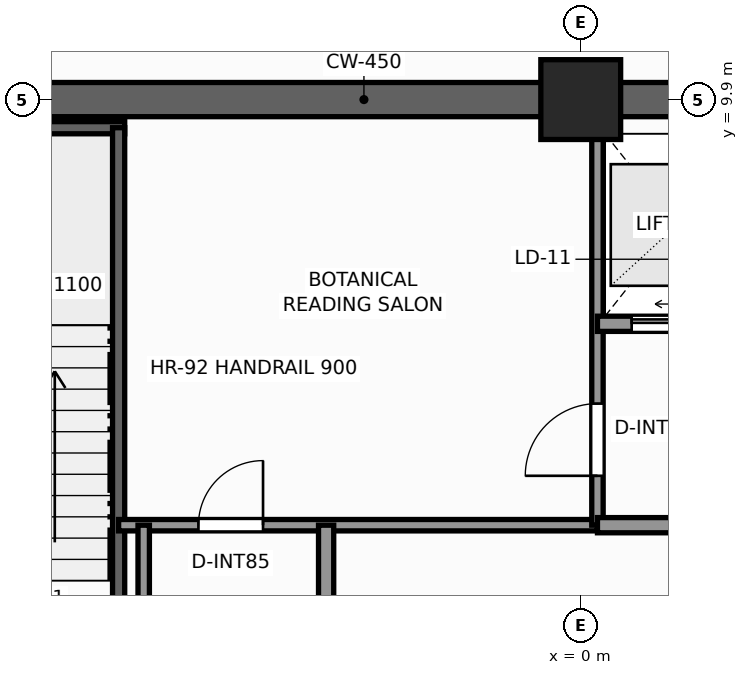
"""IFC4 building model, lengths in metres.
Left out: names, types, materials, properties, quantities, classifications, styles, units other than length and angle.
Written with IfcOpenShell. Run it as: python <this file> out.ifc"""

import sys

from ifc_helpers import new_model, si_unit, direction, frame, frame_2d, origin, origin_2d, place, context, subcontext, project, spatial, rectangle, extrude, element, fill, save


model = new_model("IFC4")
c1 = context("Model", 3, precision=1e-05, world=origin(), true_north=direction((0.0, 1.0)))
c2 = subcontext(c1, "Body", "Model", "MODEL_VIEW")
j1 = project(units=[si_unit("LENGTHUNIT", "METRE"), si_unit("PLANEANGLEUNIT", "RADIAN")], contexts=[c1])
p1 = place(None, origin())
s1 = spatial("IfcSite", under=j1, at=p1, CompositionType="ELEMENT")
p2 = place(p1, origin())
s2 = spatial("IfcBuilding", under=s1, at=p2, CompositionType="ELEMENT")
p3 = place(p2, frame((0.0, 0.0, 262.8)))
s3 = spatial("IfcBuildingStorey", under=s2, at=p3, CompositionType="ELEMENT", Elevation=262.8)
p4 = place(p3, frame((-10.125, 9.9, 0.0), z_axis=(0.0, 0.0, 1.0), x_axis=(1.0, 0.0, 0.0)))
e1 = element("IfcWall", 1, at=p4, inside=s3, PredefinedType="SHEAR", context=c2, shape_type="SweptSolid", body=[
    extrude(rectangle(XDim=14.545, YDim=0.45, at=frame_2d((7.272, 0.0))), origin(), (0.0, 0.0, 1.0), 4.6),
])
p5 = place(p3, frame((0.0, 9.9, 0.0), z_axis=(0.0, 0.0, 1.0), x_axis=(1.0, 0.0, 0.0)))
e2 = element("IfcColumn", 2, at=p5, inside=s3, PredefinedType="COLUMN", context=c2, shape_type="SweptSolid", body=[
    extrude(rectangle(XDim=1.05, YDim=1.05, at=origin_2d()), origin(), (0.0, 0.0, 1.0), 4.6),
])
p6 = place(p3, frame((-9.52, 9.53, 0.0), z_axis=(0.0, 0.0, 1.0), x_axis=(1.0, 0.0, 0.0)))
e3 = element("IfcWall", 3, at=p6, inside=s3, PredefinedType="SHEAR", context=c2, shape_type="SweptSolid", body=[
    extrude(rectangle(XDim=3.52, YDim=0.16, at=frame_2d((1.76, 0.0))), origin(), (0.0, 0.0, 1.0), 4.6),
])
p7 = place(p3, frame((-6.08, 1.97, 0.0), z_axis=(0.0, 0.0, 1.0), x_axis=(0.0, 1.0, 0.0)))
e4 = element("IfcWall", 4, at=p7, inside=s3, PredefinedType="SHEAR", context=c2, shape_type="SweptSolid", body=[
    extrude(rectangle(XDim=7.56, YDim=0.16, at=frame_2d((3.78, 0.0))), origin(), (0.0, 0.0, 1.0), 4.6),
])
p8 = place(p3, frame((-6.08, 4.3, 0.0), z_axis=(0.0, 0.0, 1.0), x_axis=(1.0, 0.0, 0.0)))
e5 = element("IfcWall", 5, at=p8, inside=s3, PredefinedType="PARTITIONING", context=c2, shape_type="SweptSolid", body=[
    extrude(rectangle(XDim=6.3, YDim=0.15, at=frame_2d((3.15, 0.0))), origin(), (0.0, 0.0, 1.0), 4.32),
])
p9 = place(p8, frame((1.05, 0.0, 0.0)))
e6 = element("IfcOpeningElement", 6, at=p9, cuts=e5, PredefinedType="OPENING", context=c2, shape_type="SweptSolid", body=[
    extrude(rectangle(XDim=0.85, YDim=2.03, at=frame_2d((0.425, 1.015))), frame((0.0, 0.085, 0.0), z_axis=(0.0, -1.0, 0.0), x_axis=(1.0, 0.0, 0.0)), (0.0, 0.0, 1.0), 0.17),
])
p10 = place(p3, frame((0.22, 4.3, 0.0), z_axis=(0.0, 0.0, 1.0), x_axis=(0.0, 1.0, 0.0)))
e7 = element("IfcWall", 7, at=p10, inside=s3, PredefinedType="PARTITIONING", context=c2, shape_type="SweptSolid", body=[
    extrude(rectangle(XDim=5.22, YDim=0.15, at=frame_2d((2.61, 0.0))), origin(), (0.0, 0.0, 1.0), 4.32),
])
p11 = place(p10, frame((0.65, 0.0, 0.0)))
e8 = element("IfcOpeningElement", 8, at=p11, cuts=e7, PredefinedType="OPENING", context=c2, shape_type="SweptSolid", body=[
    extrude(rectangle(XDim=0.95, YDim=2.06, at=frame_2d((0.475, 1.03))), frame((0.0, 0.085, 0.0), z_axis=(0.0, -1.0, 0.0), x_axis=(1.0, 0.0, 0.0)), (0.0, 0.0, 1.0), 0.17),
])
p12 = place(p3, frame((0.22, 6.95, 0.0), z_axis=(0.0, 0.0, 1.0), x_axis=(1.0, 0.0, 0.0)))
e9 = element("IfcWall", 9, at=p12, inside=s3, PredefinedType="SOLIDWALL", context=c2, shape_type="SweptSolid", body=[
    extrude(rectangle(XDim=4.18, YDim=0.2, at=frame_2d((2.09, 0.0))), origin(), (0.0, 0.0, 1.0), 4.32),
])
p13 = place(p12, frame((0.45, 0.0, 0.0)))
e10 = element("IfcOpeningElement", 10, at=p13, cuts=e9, PredefinedType="OPENING", context=c2, shape_type="SweptSolid", body=[
    extrude(rectangle(XDim=1.1, YDim=2.2, at=frame_2d((0.55, 1.1))), frame((0.0, 0.11, 0.0), z_axis=(0.0, -1.0, 0.0), x_axis=(1.0, 0.0, 0.0)), (0.0, 0.0, 1.0), 0.22),
])
p14 = place(p12, frame((2.53, 0.0, 0.0)))
e11 = element("IfcOpeningElement", 11, at=p14, cuts=e9, PredefinedType="OPENING", context=c2, shape_type="SweptSolid", body=[
    extrude(rectangle(XDim=1.1, YDim=2.2, at=frame_2d((0.55, 1.1))), frame((0.0, 0.11, 0.0), z_axis=(0.0, -1.0, 0.0), x_axis=(1.0, 0.0, 0.0)), (0.0, 0.0, 1.0), 0.22),
])
p15 = place(p3, frame((0.22, 4.3, 0.0), z_axis=(0.0, 0.0, 1.0), x_axis=(1.0, 0.0, 0.0)))
e12 = element("IfcWall", 12, at=p15, inside=s3, PredefinedType="SOLIDWALL", context=c2, shape_type="SweptSolid", body=[
    extrude(rectangle(XDim=3.13, YDim=0.2, at=frame_2d((1.565, 0.0))), origin(), (0.0, 0.0, 1.0), 4.32),
])
p16 = place(p15, frame((1.05, 0.0, 0.0)))
e13 = element("IfcOpeningElement", 13, at=p16, cuts=e12, PredefinedType="OPENING", context=c2, shape_type="SweptSolid", body=[
    extrude(rectangle(XDim=0.95, YDim=2.06, at=frame_2d((0.475, 1.03))), frame((0.0, 0.11, 0.0), z_axis=(0.0, -1.0, 0.0), x_axis=(1.0, 0.0, 0.0)), (0.0, 0.0, 1.0), 0.22),
])
p17 = place(p3, frame((-3.35, 1.1, 0.0), z_axis=(0.0, 0.0, 1.0), x_axis=(0.0, 1.0, 0.0)))
e14 = element("IfcWall", 14, at=p17, inside=s3, PredefinedType="SOLIDWALL", context=c2, shape_type="SweptSolid", body=[
    extrude(rectangle(XDim=3.2, YDim=0.2, at=frame_2d((1.6, 0.0))), origin(), (0.0, 0.0, 1.0), 4.32),
])
p18 = place(p3, frame((-5.75, 1.97, 0.0), z_axis=(0.0, 0.0, 1.0), x_axis=(0.0, 1.0, 0.0)))
e15 = element("IfcWall", 15, at=p18, inside=s3, PredefinedType="PARTITIONING", context=c2, shape_type="SweptSolid", body=[
    extrude(rectangle(XDim=2.33, YDim=0.15, at=frame_2d((1.165, 0.0))), origin(), (0.0, 0.0, 1.0), 4.32),
])
p19 = place(p11, origin())
e16 = element("IfcDoor", 16, at=p19, inside=s3, OperationType="SINGLE_SWING_LEFT", PredefinedType="DOOR", context=c2, shape_type="SweptSolid", body=[
    extrude(rectangle(XDim=0.95, YDim=2.06, at=frame_2d((0.475, 1.03))), frame((0.0, 0.025, 0.0), z_axis=(0.0, -1.0, 0.0), x_axis=(1.0, 0.0, 0.0)), (0.0, 0.0, 1.0), 0.05),
])
fill(e8, e16)
p20 = place(p13, origin())
e17 = element("IfcDoor", 17, at=p20, inside=s3, OperationType="DOUBLE_DOOR_SLIDING", PredefinedType="DOOR", context=c2, shape_type="SweptSolid", body=[
    extrude(rectangle(XDim=1.1, YDim=2.2, at=frame_2d((0.55, 1.1))), frame((0.0, 0.025, 0.0), z_axis=(0.0, -1.0, 0.0), x_axis=(1.0, 0.0, 0.0)), (0.0, 0.0, 1.0), 0.05),
])
fill(e10, e17)
p21 = place(p9, origin())
e18 = element("IfcDoor", 18, at=p21, inside=s3, OperationType="SINGLE_SWING_RIGHT", PredefinedType="DOOR", context=c2, shape_type="SweptSolid", body=[
    extrude(rectangle(XDim=0.85, YDim=2.03, at=frame_2d((0.425, 1.015))), frame((0.0, 0.025, 0.0), z_axis=(0.0, -1.0, 0.0), x_axis=(1.0, 0.0, 0.0)), (0.0, 0.0, 1.0), 0.05),
])
fill(e6, e18)
save(model, sys.argv[1])
